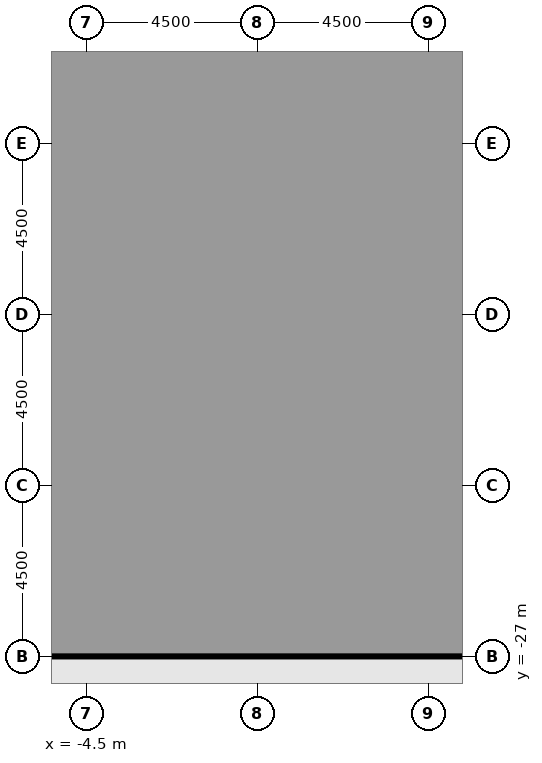
"""IFC4 building model, lengths in metres.
Left out: names, types, materials, properties, quantities, classifications, styles, units other than length and angle.
Written with IfcOpenShell. Run it as: python <this file> out.ifc"""

import sys

from ifc_helpers import new_model, si_unit, direction, frame, frame_2d, origin, origin_2d, place, context, subcontext, project, spatial, rectangle, extrude, element, fill, save


model = new_model("IFC4")
c1 = context("Model", 3, precision=1e-05, world=origin(), true_north=direction((0.0, 1.0)))
c2 = subcontext(c1, "Body", "Model", "MODEL_VIEW")
j1 = project(units=[si_unit("LENGTHUNIT", "METRE"), si_unit("PLANEANGLEUNIT", "RADIAN")], contexts=[c1])
p1 = place(None, origin())
s1 = spatial("IfcSite", under=j1, at=p1, CompositionType="ELEMENT")
p2 = place(p1, origin())
s2 = spatial("IfcBuilding", under=s1, at=p2, CompositionType="ELEMENT")
p3 = place(p2, frame((0.0, 0.0, 7.2)))
s3 = spatial("IfcBuildingStorey", under=s2, at=p3, CompositionType="ELEMENT", Elevation=7.2)
for number, where, z_axis, x_axis in (
    (1, (-4.5, -27.0, -0.45), (0.0, 0.0, 1.0), (1.0, 0.0, 0.0)),
    (2, (0.0, -27.0, -0.45), (0.0, 0.0, 1.0), (1.0, 0.0, 0.0)),
    (3, (4.5, -27.0, -0.45), (0.0, 0.0, 1.0), (1.0, 0.0, 0.0)),
):
    element("IfcColumn", number, at=place(p3, frame(where, z_axis=z_axis, x_axis=x_axis)), inside=s3, PredefinedType="COLUMN", context=c2, shape_type="SweptSolid", body=[
        extrude(rectangle(XDim=1.4, YDim=1.4, at=origin_2d()), origin(), (0.0, 0.0, 1.0), 4.55),
    ])
p4 = place(p3, frame((0.0, -18.0, 0.0), z_axis=(0.0, 0.0, 1.0), x_axis=(1.0, 0.0, 0.0)))
e4 = element("IfcColumn", 4, at=p4, inside=s3, PredefinedType="COLUMN", context=c2, shape_type="SweptSolid", body=[
    extrude(rectangle(XDim=1.6, YDim=1.6, at=origin_2d()), origin(), (0.0, 0.0, 1.0), 4.1),
])
p5 = place(p3, frame((-5.2, -27.0, 0.0), z_axis=(0.0, 0.0, 1.0), x_axis=(-1.0, 0.0, 0.0)))
e5 = element("IfcWall", 5, at=p5, inside=s3, PredefinedType="SOLIDWALL", context=c2, shape_type="SweptSolid", body=[
    extrude(rectangle(XDim=3.1, YDim=0.3, at=frame_2d((1.55, 0.0))), origin(), (0.0, 0.0, 1.0), 2.75),
])
p6 = place(p5, frame((0.35, 0.0, 0.8)))
e6 = element("IfcOpeningElement", 6, at=p6, cuts=e5, PredefinedType="OPENING", context=c2, shape_type="SweptSolid", body=[
    extrude(rectangle(XDim=2.4, YDim=1.7, at=frame_2d((1.2, 0.85))), frame((0.0, 0.16, 0.0), z_axis=(0.0, -1.0, 0.0), x_axis=(1.0, 0.0, 0.0)), (0.0, 0.0, 1.0), 0.32),
])
p7 = place(p3, frame((-0.7, -27.0, 0.0), z_axis=(0.0, 0.0, 1.0), x_axis=(-1.0, 0.0, 0.0)))
e7 = element("IfcWall", 7, at=p7, inside=s3, PredefinedType="SOLIDWALL", context=c2, shape_type="SweptSolid", body=[
    extrude(rectangle(XDim=3.1, YDim=0.3, at=frame_2d((1.55, 0.0))), origin(), (0.0, 0.0, 1.0), 2.75),
])
p8 = place(p7, frame((0.35, 0.0, 0.8)))
e8 = element("IfcOpeningElement", 8, at=p8, cuts=e7, PredefinedType="OPENING", context=c2, shape_type="SweptSolid", body=[
    extrude(rectangle(XDim=2.4, YDim=1.7, at=frame_2d((1.2, 0.85))), frame((0.0, 0.16, 0.0), z_axis=(0.0, -1.0, 0.0), x_axis=(1.0, 0.0, 0.0)), (0.0, 0.0, 1.0), 0.32),
])
p9 = place(p3, frame((3.8, -27.0, 0.0), z_axis=(0.0, 0.0, 1.0), x_axis=(-1.0, 0.0, 0.0)))
e9 = element("IfcWall", 9, at=p9, inside=s3, PredefinedType="SOLIDWALL", context=c2, shape_type="SweptSolid", body=[
    extrude(rectangle(XDim=3.1, YDim=0.3, at=frame_2d((1.55, 0.0))), origin(), (0.0, 0.0, 1.0), 2.75),
])
p10 = place(p9, frame((0.35, 0.0, 0.8)))
e10 = element("IfcOpeningElement", 10, at=p10, cuts=e9, PredefinedType="OPENING", context=c2, shape_type="SweptSolid", body=[
    extrude(rectangle(XDim=2.4, YDim=1.7, at=frame_2d((1.2, 0.85))), frame((0.0, 0.16, 0.0), z_axis=(0.0, -1.0, 0.0), x_axis=(1.0, 0.0, 0.0)), (0.0, 0.0, 1.0), 0.32),
])
p11 = place(p3, frame((8.3, -27.0, 0.0), z_axis=(0.0, 0.0, 1.0), x_axis=(-1.0, 0.0, 0.0)))
e11 = element("IfcWall", 11, at=p11, inside=s3, PredefinedType="SOLIDWALL", context=c2, shape_type="SweptSolid", body=[
    extrude(rectangle(XDim=3.1, YDim=0.3, at=frame_2d((1.55, 0.0))), origin(), (0.0, 0.0, 1.0), 2.75),
])
p12 = place(p11, frame((0.35, 0.0, 0.8)))
e12 = element("IfcOpeningElement", 12, at=p12, cuts=e11, PredefinedType="OPENING", context=c2, shape_type="SweptSolid", body=[
    extrude(rectangle(XDim=2.4, YDim=1.7, at=frame_2d((1.2, 0.85))), frame((0.0, 0.16, 0.0), z_axis=(0.0, -1.0, 0.0), x_axis=(1.0, 0.0, 0.0)), (0.0, 0.0, 1.0), 0.32),
])
for number, where, z_axis, x_axis in (
    (13, (-4.5, -26.3, 0.0), (0.0, 0.0, 1.0), (0.0, 1.0, 0.0)),
    (14, (4.5, -26.3, 0.0), (0.0, 0.0, 1.0), (0.0, 1.0, 0.0)),
):
    element("IfcWall", number, at=place(p3, frame(where, z_axis=z_axis, x_axis=x_axis)), inside=s3, PredefinedType="PARTITIONING", context=c2, shape_type="SweptSolid", body=[
        extrude(rectangle(XDim=14.3, YDim=0.2, at=frame_2d((7.15, 0.0))), origin(), (0.0, 0.0, 1.0), 3.65),
    ])
p13 = place(p3, frame((-8.2, -18.3, 0.0), z_axis=(0.0, 0.0, 1.0), x_axis=(1.0, 0.0, 0.0)))
e15 = element("IfcWall", 15, at=p13, inside=s3, PredefinedType="PARTITIONING", context=c2, shape_type="SweptSolid", body=[
    extrude(rectangle(XDim=7.4, YDim=0.15, at=frame_2d((3.7, 0.0))), origin(), (0.0, 0.0, 1.0), 3.65),
])
p14 = place(p3, frame((8.2, -18.3, 0.0), z_axis=(0.0, 0.0, 1.0), x_axis=(-1.0, 0.0, 0.0)))
e16 = element("IfcWall", 16, at=p14, inside=s3, PredefinedType="PARTITIONING", context=c2, shape_type="SweptSolid", body=[
    extrude(rectangle(XDim=7.4, YDim=0.15, at=frame_2d((3.7, 0.0))), origin(), (0.0, 0.0, 1.0), 3.65),
])
p15 = place(p14, frame((6.1, 0.0, 0.0)))
e17 = element("IfcOpeningElement", 17, at=p15, cuts=e16, PredefinedType="OPENING", context=c2, shape_type="SweptSolid", body=[
    extrude(rectangle(XDim=1.0, YDim=2.1, at=frame_2d((0.5, 1.05))), frame((0.0, 0.085, 0.0), z_axis=(0.0, -1.0, 0.0), x_axis=(1.0, 0.0, 0.0)), (0.0, 0.0, 1.0), 0.17),
])
p16 = place(p14, frame((0.1, 0.0, 0.0)))
e18 = element("IfcOpeningElement", 18, at=p16, cuts=e16, PredefinedType="OPENING", context=c2, shape_type="SweptSolid", body=[
    extrude(rectangle(XDim=1.0, YDim=2.1, at=frame_2d((0.5, 1.05))), frame((0.0, 0.085, 0.0), z_axis=(0.0, -1.0, 0.0), x_axis=(1.0, 0.0, 0.0)), (0.0, 0.0, 1.0), 0.17),
])
p17 = place(p3, frame((26.85, -12.0, 0.0), z_axis=(0.0, 0.0, 1.0), x_axis=(-1.0, 0.0, 0.0)))
e19 = element("IfcWall", 19, at=p17, inside=s3, PredefinedType="PARTITIONING", context=c2, shape_type="SweptSolid", body=[
    extrude(rectangle(XDim=53.7, YDim=0.2, at=frame_2d((26.85, 0.0))), origin(), (0.0, 0.0, 1.0), 3.65),
])
p18 = place(p17, frame((47.75, 0.0, 0.0)))
e20 = element("IfcOpeningElement", 20, at=p18, cuts=e19, PredefinedType="OPENING", context=c2, shape_type="SweptSolid", body=[
    extrude(rectangle(XDim=1.0, YDim=2.1, at=frame_2d((0.5, 1.05))), frame((0.0, 0.11, 0.0), z_axis=(0.0, -1.0, 0.0), x_axis=(1.0, 0.0, 0.0)), (0.0, 0.0, 1.0), 0.22),
])
p19 = place(p17, frame((35.75, 0.0, 0.0)))
e21 = element("IfcOpeningElement", 21, at=p19, cuts=e19, PredefinedType="OPENING", context=c2, shape_type="SweptSolid", body=[
    extrude(rectangle(XDim=1.0, YDim=2.1, at=frame_2d((0.5, 1.05))), frame((0.0, 0.11, 0.0), z_axis=(0.0, -1.0, 0.0), x_axis=(1.0, 0.0, 0.0)), (0.0, 0.0, 1.0), 0.22),
])
p20 = place(p17, frame((25.5, 0.0, 0.0)))
e22 = element("IfcOpeningElement", 22, at=p20, cuts=e19, PredefinedType="OPENING", context=c2, shape_type="SweptSolid", body=[
    extrude(rectangle(XDim=1.0, YDim=2.1, at=frame_2d((0.5, 1.05))), frame((0.0, 0.11, 0.0), z_axis=(0.0, -1.0, 0.0), x_axis=(1.0, 0.0, 0.0)), (0.0, 0.0, 1.0), 0.22),
])
p21 = place(p17, frame((18.25, 0.0, 0.0)))
e23 = element("IfcOpeningElement", 23, at=p21, cuts=e19, PredefinedType="OPENING", context=c2, shape_type="SweptSolid", body=[
    extrude(rectangle(XDim=1.0, YDim=2.1, at=frame_2d((0.5, 1.05))), frame((0.0, 0.11, 0.0), z_axis=(0.0, -1.0, 0.0), x_axis=(1.0, 0.0, 0.0)), (0.0, 0.0, 1.0), 0.22),
])
p22 = place(p17, frame((10.25, 0.0, 0.0)))
e24 = element("IfcOpeningElement", 24, at=p22, cuts=e19, PredefinedType="OPENING", context=c2, shape_type="SweptSolid", body=[
    extrude(rectangle(XDim=1.0, YDim=2.1, at=frame_2d((0.5, 1.05))), frame((0.0, 0.11, 0.0), z_axis=(0.0, -1.0, 0.0), x_axis=(1.0, 0.0, 0.0)), (0.0, 0.0, 1.0), 0.22),
])
p23 = place(p17, frame((3.0, 0.0, 0.0)))
e25 = element("IfcOpeningElement", 25, at=p23, cuts=e19, PredefinedType="OPENING", context=c2, shape_type="SweptSolid", body=[
    extrude(rectangle(XDim=1.0, YDim=2.1, at=frame_2d((0.5, 1.05))), frame((0.0, 0.11, 0.0), z_axis=(0.0, -1.0, 0.0), x_axis=(1.0, 0.0, 0.0)), (0.0, 0.0, 1.0), 0.22),
])
p24 = place(p8, origin())
e26 = element("IfcWindow", 26, at=p24, inside=s3, PartitioningType="SINGLE_PANEL", PredefinedType="WINDOW", context=c2, shape_type="SweptSolid", body=[
    extrude(rectangle(XDim=2.4, YDim=1.7, at=frame_2d((1.2, 0.85))), frame((0.0, 0.03, 0.0), z_axis=(0.0, -1.0, 0.0), x_axis=(1.0, 0.0, 0.0)), (0.0, 0.0, 1.0), 0.06),
])
fill(e8, e26)
p25 = place(p10, origin())
e27 = element("IfcWindow", 27, at=p25, inside=s3, PartitioningType="SINGLE_PANEL", PredefinedType="WINDOW", context=c2, shape_type="SweptSolid", body=[
    extrude(rectangle(XDim=2.4, YDim=1.7, at=frame_2d((1.2, 0.85))), frame((0.0, 0.03, 0.0), z_axis=(0.0, -1.0, 0.0), x_axis=(1.0, 0.0, 0.0)), (0.0, 0.0, 1.0), 0.06),
])
fill(e10, e27)
p26 = place(p15, origin())
e28 = element("IfcDoor", 28, at=p26, inside=s3, OperationType="SINGLE_SWING_RIGHT", PredefinedType="DOOR", context=c2, shape_type="SweptSolid", body=[
    extrude(rectangle(XDim=1.0, YDim=2.1, at=frame_2d((0.5, 1.05))), frame((0.0, 0.025, 0.0), z_axis=(0.0, -1.0, 0.0), x_axis=(1.0, 0.0, 0.0)), (0.0, 0.0, 1.0), 0.05),
])
fill(e17, e28)
p27 = place(p20, origin())
e29 = element("IfcDoor", 29, at=p27, inside=s3, OperationType="SINGLE_SWING_LEFT", PredefinedType="DOOR", context=c2, shape_type="SweptSolid", body=[
    extrude(rectangle(XDim=1.0, YDim=2.1, at=frame_2d((0.5, 1.05))), frame((0.0, 0.025, 0.0), z_axis=(0.0, -1.0, 0.0), x_axis=(1.0, 0.0, 0.0)), (0.0, 0.0, 1.0), 0.05),
])
fill(e22, e29)
save(model, sys.argv[1])
